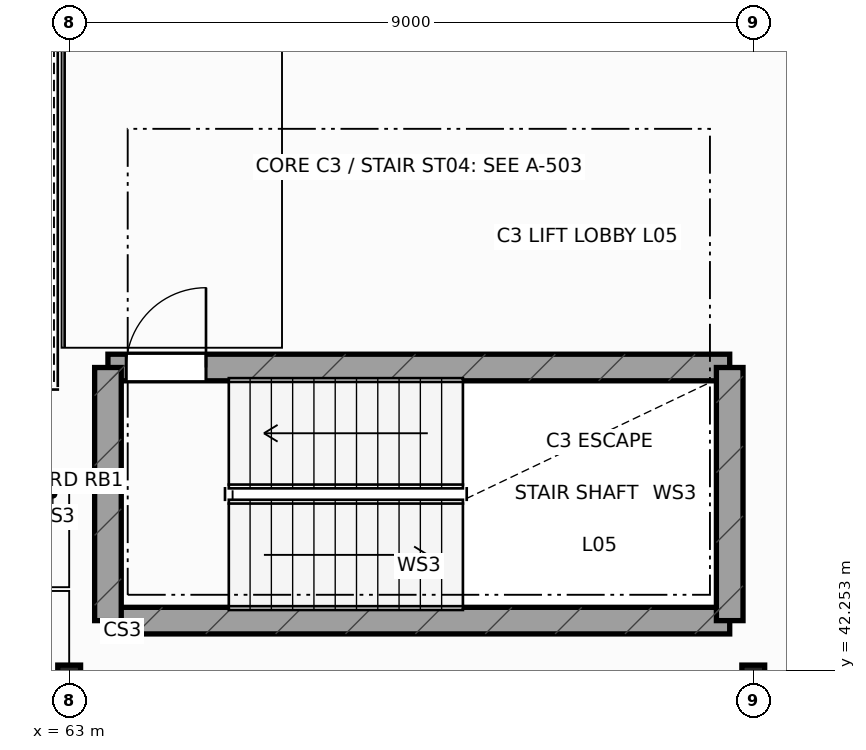
"""IFC4 building model, lengths in metres.
Left out: names, types, materials, properties, quantities, classifications, styles, units other than length and angle.
Written with IfcOpenShell. Run it as: python <this file> out.ifc"""

import sys

from ifc_helpers import new_model, si_unit, direction, frame, frame_2d, origin, origin_2d, place, context, subcontext, project, spatial, rectangle, i_section, extrude, element, fill, save


model = new_model("IFC4")
c1 = context("Model", 3, precision=1e-05, world=origin(), true_north=direction((0.0, 1.0)))
c2 = subcontext(c1, "Body", "Model", "MODEL_VIEW")
j1 = project(units=[si_unit("LENGTHUNIT", "METRE"), si_unit("PLANEANGLEUNIT", "RADIAN")], contexts=[c1])
p1 = place(None, origin())
s1 = spatial("IfcSite", under=j1, at=p1, CompositionType="ELEMENT")
p2 = place(p1, origin())
s2 = spatial("IfcBuilding", under=s1, at=p2, CompositionType="ELEMENT")
p3 = place(p2, frame((0.0, 0.0, 26.4)))
s3 = spatial("IfcBuildingStorey", under=s2, at=p3, CompositionType="ELEMENT", Elevation=26.4)
for number, where, z_axis, x_axis in (
    (1, (63.0, 42.0, 0.0), (0.0, 0.0, 1.0), (1.0, 0.0, 0.0)),
    (2, (72.0, 42.0, 0.0), (0.0, 0.0, 1.0), (1.0, 0.0, 0.0)),
):
    element("IfcColumn", number, at=place(p3, frame(where, z_axis=z_axis, x_axis=x_axis)), inside=s3, PredefinedType="COLUMN", context=c2, shape_type="SweptSolid", body=[
        extrude(i_section(OverallWidth=0.3, OverallDepth=0.65, WebThickness=0.016, FlangeThickness=0.031, at=origin_2d()), origin(), (0.0, 0.0, 1.0), 4.2),
    ])
p4 = place(p3, frame((63.51, 42.91, 0.0), z_axis=(0.0, 0.0, 1.0), x_axis=(1.0, 0.0, 0.0)))
e3 = element("IfcWall", 3, at=p4, inside=s3, PredefinedType="SHEAR", context=c2, shape_type="SweptSolid", body=[
    extrude(rectangle(XDim=8.18, YDim=0.35, at=frame_2d((4.09, 0.0))), origin(), (0.0, 0.0, 1.0), 3.94),
])
p5 = place(p3, frame((63.51, 46.24, 0.0), z_axis=(0.0, 0.0, 1.0), x_axis=(1.0, 0.0, 0.0)))
e4 = element("IfcWall", 4, at=p5, inside=s3, PredefinedType="SHEAR", context=c2, shape_type="SweptSolid", body=[
    extrude(rectangle(XDim=8.18, YDim=0.35, at=frame_2d((4.09, 0.0))), origin(), (0.0, 0.0, 1.0), 3.94),
])
p6 = place(p5, frame((0.24, 0.0, 0.0)))
e5 = element("IfcOpeningElement", 5, at=p6, cuts=e4, PredefinedType="OPENING", context=c2, shape_type="SweptSolid", body=[
    extrude(rectangle(XDim=1.05, YDim=2.18, at=frame_2d((0.525, 1.09))), frame((0.0, 0.185, 0.0), z_axis=(0.0, -1.0, 0.0), x_axis=(1.0, 0.0, 0.0)), (0.0, 0.0, 1.0), 0.37),
])
for number, where, z_axis, x_axis in (
    (6, (63.51, 42.91, 0.0), (0.0, 0.0, 1.0), (0.0, 1.0, 0.0)),
    (7, (71.69, 42.91, 0.0), (0.0, 0.0, 1.0), (0.0, 1.0, 0.0)),
):
    element("IfcWall", number, at=place(p3, frame(where, z_axis=z_axis, x_axis=x_axis)), inside=s3, PredefinedType="SHEAR", context=c2, shape_type="SweptSolid", body=[
        extrude(rectangle(XDim=3.33, YDim=0.35, at=frame_2d((1.665, 0.0))), origin(), (0.0, 0.0, 1.0), 3.94),
    ])
p7 = place(p6, origin())
e8 = element("IfcDoor", 8, at=p7, inside=s3, OperationType="SINGLE_SWING_RIGHT", PredefinedType="DOOR", context=c2, shape_type="SweptSolid", body=[
    extrude(rectangle(XDim=1.05, YDim=2.18, at=frame_2d((0.525, 1.09))), frame((0.0, 0.025, 0.0), z_axis=(0.0, -1.0, 0.0), x_axis=(1.0, 0.0, 0.0)), (0.0, 0.0, 1.0), 0.05),
])
fill(e5, e8)
save(model, sys.argv[1])
